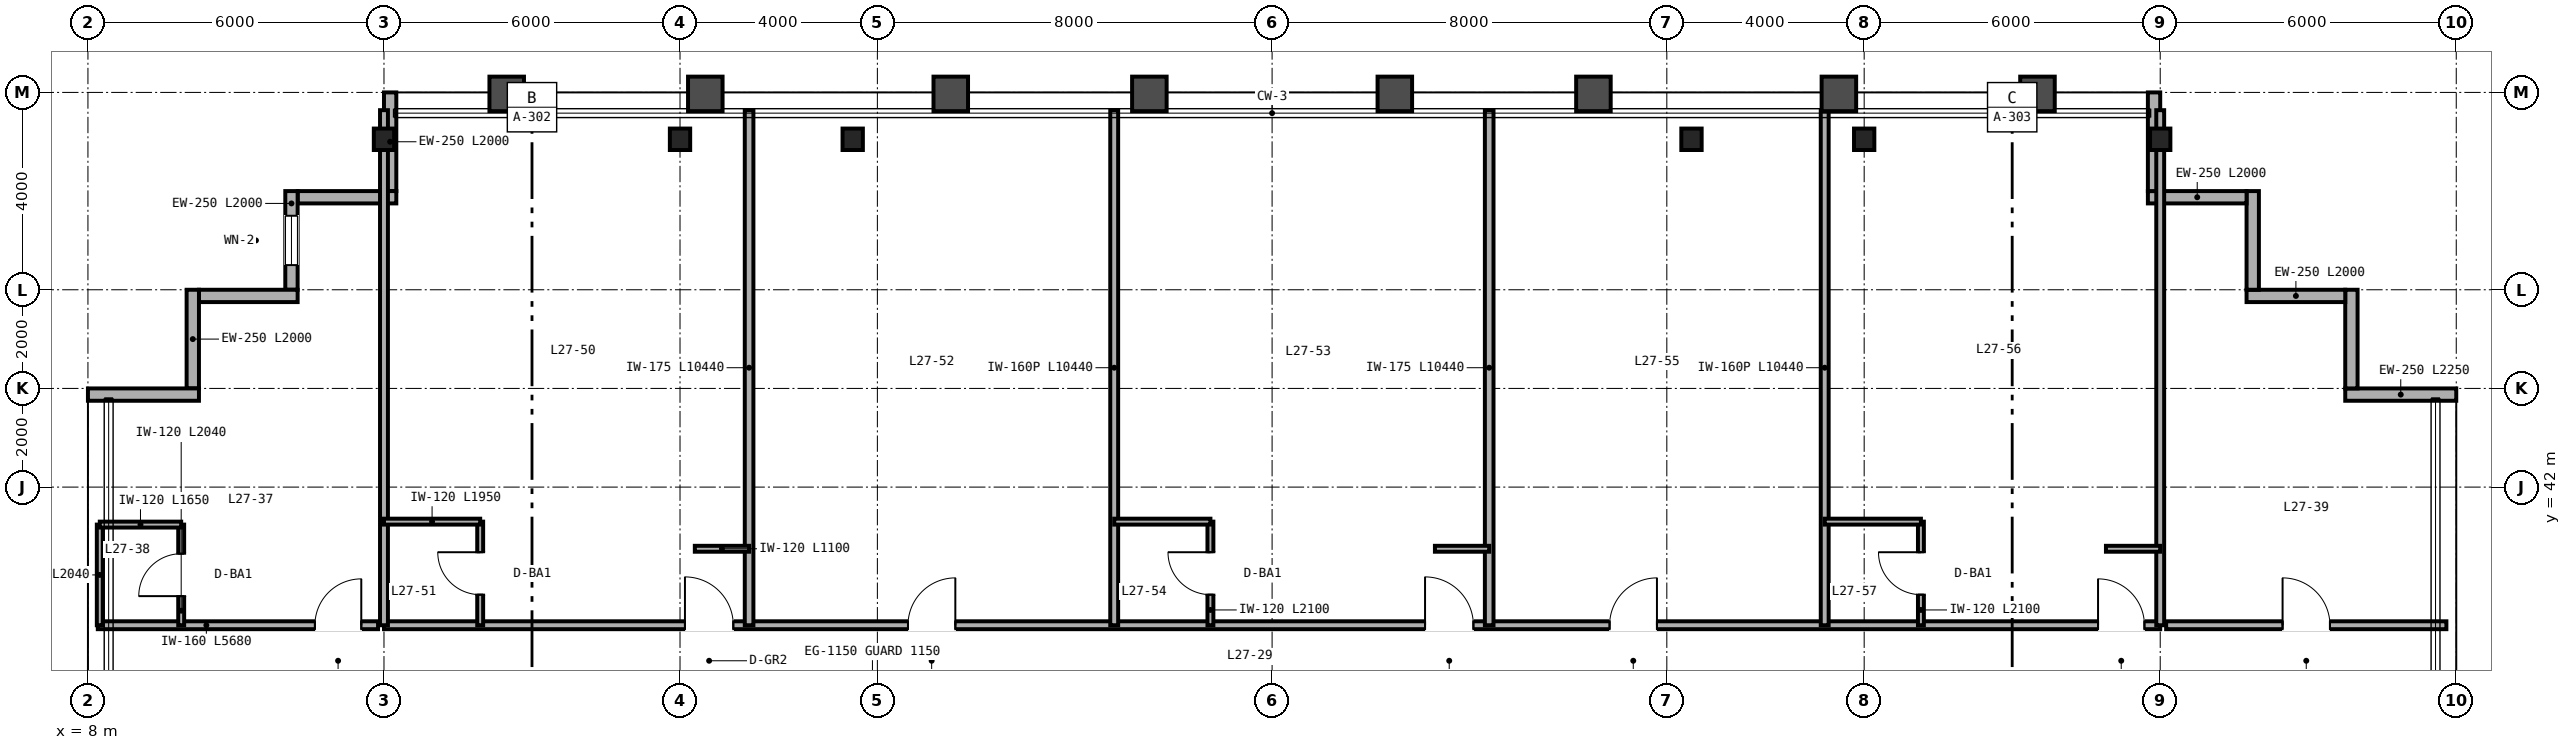
"""IFC4 building model, lengths in metres.
Left out: names, types, materials, properties, quantities, classifications, styles, units other than length and angle.
Written with IfcOpenShell. Run it as: python <this file> out.ifc"""

import sys

from ifc_helpers import new_model, si_unit, direction, frame, frame_2d, origin, origin_2d, place, context, subcontext, project, spatial, rectangle, i_section, extrude, source, transform, mapped, element, fill, save


model = new_model("IFC4")
c1 = context("Model", 3, precision=1e-05, world=origin(), true_north=direction((0.0, 1.0)))
c2 = subcontext(c1, "Body", "Model", "MODEL_VIEW")
j1 = project(units=[si_unit("LENGTHUNIT", "METRE"), si_unit("PLANEANGLEUNIT", "RADIAN")], contexts=[c1])
p1 = place(None, origin())
s1 = spatial("IfcSite", under=j1, at=p1, CompositionType="ELEMENT")
p2 = place(p1, origin())
s2 = spatial("IfcBuilding", under=s1, at=p2, CompositionType="ELEMENT")
p3 = place(p2, frame((0.0, 0.0, 111.6)))
s3 = spatial("IfcBuildingStorey", under=s2, at=p3, CompositionType="ELEMENT", Elevation=111.6)
m1 = source(origin(), c2, "Body", "SweptSolid", [
    extrude(i_section(OverallWidth=0.412, OverallDepth=0.435, WebThickness=0.036, FlangeThickness=0.057, FilletRadius=0.025, at=origin_2d()), origin(), (0.0, 0.0, 1.0), 3.36),
])
for number, where, z_axis, x_axis in (
    (1, (14.0, 49.05, 0.0), (0.0, 0.0, 1.0), (1.0, 0.0, 0.0)),
    (2, (20.0, 49.05, 0.0), (0.0, 0.0, 1.0), (1.0, 0.0, 0.0)),
    (3, (23.5, 49.05, 0.0), (0.0, 0.0, 1.0), (1.0, 0.0, 0.0)),
    (4, (40.5, 49.05, 0.0), (0.0, 0.0, 1.0), (1.0, 0.0, 0.0)),
    (5, (44.0, 49.05, 0.0), (0.0, 0.0, 1.0), (1.0, 0.0, 0.0)),
    (6, (50.0, 49.05, 0.0), (0.0, 0.0, 1.0), (1.0, 0.0, 0.0)),
):
    element("IfcColumn", number, at=place(p3, frame(where, z_axis=z_axis, x_axis=x_axis)), inside=s3, PredefinedType="COLUMN", context=c2, shape_type="MappedRepresentation", body=[
        mapped(m1, transform((0.0, 0.0, 0.0), scale=1.0)),
    ])
p4 = place(p3, frame((56.0, 43.875, 0.0), z_axis=(0.0, 0.0, 1.0), x_axis=(-1.0, 0.0, 0.0)))
e7 = element("IfcWall", 7, at=p4, inside=s3, PredefinedType="SOLIDWALL", context=c2, shape_type="SweptSolid", body=[
    extrude(rectangle(XDim=2.25, YDim=0.25, at=frame_2d((1.125, 0.0))), origin(), (0.0, 0.0, 1.0), 3.36),
])
for number, where, z_axis, x_axis in (
    (8, (53.875, 44.0, 0.0), (0.0, 0.0, 1.0), (0.0, 1.0, 0.0)),
    (9, (53.75, 45.875, 0.0), (0.0, 0.0, 1.0), (-1.0, 0.0, 0.0)),
    (10, (51.875, 46.0, 0.0), (0.0, 0.0, 1.0), (0.0, 1.0, 0.0)),
    (11, (51.75, 47.875, 0.0), (0.0, 0.0, 1.0), (-1.0, 0.0, 0.0)),
):
    element("IfcWall", number, at=place(p3, frame(where, z_axis=z_axis, x_axis=x_axis)), inside=s3, PredefinedType="SOLIDWALL", context=c2, shape_type="SweptSolid", body=[
        extrude(rectangle(XDim=2.0, YDim=0.25, at=frame_2d((1.0, 0.0))), origin(), (0.0, 0.0, 1.0), 3.36),
    ])
for number, where, z_axis, x_axis in (
    (12, (49.875, 48.0, 0.0), (0.0, 0.0, 1.0), (0.0, 1.0, 0.0)),
    (13, (14.125, 50.0, 0.0), (0.0, 0.0, 1.0), (0.0, -1.0, 0.0)),
):
    element("IfcWall", number, at=place(p3, frame(where, z_axis=z_axis, x_axis=x_axis)), inside=s3, PredefinedType="SOLIDWALL", context=c2, shape_type="SweptSolid", body=[
        extrude(rectangle(XDim=2.0, YDim=0.25, at=frame_2d((1.0, 0.0))), origin(), (0.0, 0.0, 1.0), 2.667),
    ])
p5 = place(p3, frame((14.25, 47.875, 0.0), z_axis=(0.0, 0.0, 1.0), x_axis=(-1.0, 0.0, 0.0)))
e14 = element("IfcWall", 14, at=p5, inside=s3, PredefinedType="SOLIDWALL", context=c2, shape_type="SweptSolid", body=[
    extrude(rectangle(XDim=2.0, YDim=0.25, at=frame_2d((1.0, 0.0))), origin(), (0.0, 0.0, 1.0), 3.36),
])
p6 = place(p3, frame((12.125, 48.0, 0.0), z_axis=(0.0, 0.0, 1.0), x_axis=(0.0, -1.0, 0.0)))
e15 = element("IfcWall", 15, at=p6, inside=s3, PredefinedType="SOLIDWALL", context=c2, shape_type="SweptSolid", body=[
    extrude(rectangle(XDim=2.0, YDim=0.25, at=frame_2d((1.0, 0.0))), origin(), (0.0, 0.0, 1.0), 3.36),
])
p7 = place(p6, frame((0.5, 0.0, 0.85)))
e16 = element("IfcOpeningElement", 16, at=p7, cuts=e15, PredefinedType="OPENING", context=c2, shape_type="SweptSolid", body=[
    extrude(rectangle(XDim=1.0, YDim=1.9, at=frame_2d((0.5, 0.95))), frame((0.0, 0.135, 0.0), z_axis=(0.0, -1.0, 0.0), x_axis=(1.0, 0.0, 0.0)), (0.0, 0.0, 1.0), 0.27),
])
for number, where, z_axis, x_axis in (
    (17, (12.25, 45.875, 0.0), (0.0, 0.0, 1.0), (-1.0, 0.0, 0.0)),
    (18, (10.125, 46.0, 0.0), (0.0, 0.0, 1.0), (0.0, -1.0, 0.0)),
):
    element("IfcWall", number, at=place(p3, frame(where, z_axis=z_axis, x_axis=x_axis)), inside=s3, PredefinedType="SOLIDWALL", context=c2, shape_type="SweptSolid", body=[
        extrude(rectangle(XDim=2.0, YDim=0.25, at=frame_2d((1.0, 0.0))), origin(), (0.0, 0.0, 1.0), 3.36),
    ])
p8 = place(p3, frame((10.25, 43.875, 0.0), z_axis=(0.0, 0.0, 1.0), x_axis=(-1.0, 0.0, 0.0)))
e19 = element("IfcWall", 19, at=p8, inside=s3, PredefinedType="SOLIDWALL", context=c2, shape_type="SweptSolid", body=[
    extrude(rectangle(XDim=2.25, YDim=0.25, at=frame_2d((1.125, 0.0))), origin(), (0.0, 0.0, 1.0), 3.36),
])
p9 = place(p3, frame((8.2, 39.2, 0.0), z_axis=(0.0, 0.0, 1.0), x_axis=(1.0, 0.0, 0.0)))
e20 = element("IfcWall", 20, at=p9, inside=s3, PredefinedType="PARTITIONING", context=c2, shape_type="SweptSolid", body=[
    extrude(rectangle(XDim=5.68, YDim=0.16, at=frame_2d((2.84, 0.0))), origin(), (0.0, 0.0, 1.0), 3.36),
])
p10 = place(p9, frame((4.4, 0.0, 0.0)))
e21 = element("IfcOpeningElement", 21, at=p10, cuts=e20, PredefinedType="OPENING", context=c2, shape_type="SweptSolid", body=[
    extrude(rectangle(XDim=0.94, YDim=2.15, at=frame_2d((0.47, 1.075))), frame((0.0, 0.09, 0.0), z_axis=(0.0, -1.0, 0.0), x_axis=(1.0, 0.0, 0.0)), (0.0, 0.0, 1.0), 0.18),
])
p11 = place(p3, frame((9.89, 39.2, 0.0), z_axis=(0.0, 0.0, 1.0), x_axis=(0.0, 1.0, 0.0)))
e22 = element("IfcWall", 22, at=p11, inside=s3, PredefinedType="PARTITIONING", context=c2, shape_type="SweptSolid", body=[
    extrude(rectangle(XDim=2.04, YDim=0.12, at=frame_2d((1.02, 0.0))), origin(), (0.0, 0.0, 1.0), 3.36),
])
p12 = place(p11, frame((0.59, 0.0, 0.0)))
e23 = element("IfcOpeningElement", 23, at=p12, cuts=e22, PredefinedType="OPENING", context=c2, shape_type="SweptSolid", body=[
    extrude(rectangle(XDim=0.86, YDim=2.1, at=frame_2d((0.43, 1.05))), frame((0.0, 0.07, 0.0), z_axis=(0.0, -1.0, 0.0), x_axis=(1.0, 0.0, 0.0)), (0.0, 0.0, 1.0), 0.14),
])
p13 = place(p3, frame((8.24, 39.2, 0.0), z_axis=(0.0, 0.0, 1.0), x_axis=(0.0, 1.0, 0.0)))
e24 = element("IfcWall", 24, at=p13, inside=s3, PredefinedType="PARTITIONING", context=c2, shape_type="SweptSolid", body=[
    extrude(rectangle(XDim=2.04, YDim=0.12, at=frame_2d((1.02, 0.0))), origin(), (0.0, 0.0, 1.0), 3.36),
])
p14 = place(p3, frame((8.24, 41.24, 0.0), z_axis=(0.0, 0.0, 1.0), x_axis=(1.0, 0.0, 0.0)))
e25 = element("IfcWall", 25, at=p14, inside=s3, PredefinedType="PARTITIONING", context=c2, shape_type="SweptSolid", body=[
    extrude(rectangle(XDim=1.65, YDim=0.12, at=frame_2d((0.825, 0.0))), origin(), (0.0, 0.0, 1.0), 3.36),
])
p15 = place(p3, frame((50.12, 39.2, 0.0), z_axis=(0.0, 0.0, 1.0), x_axis=(1.0, 0.0, 0.0)))
e26 = element("IfcWall", 26, at=p15, inside=s3, PredefinedType="PARTITIONING", context=c2, shape_type="SweptSolid", body=[
    extrude(rectangle(XDim=5.68, YDim=0.16, at=frame_2d((2.84, 0.0))), origin(), (0.0, 0.0, 1.0), 3.36),
])
p16 = place(p15, frame((2.36, 0.0, 0.0)))
e27 = element("IfcOpeningElement", 27, at=p16, cuts=e26, PredefinedType="OPENING", context=c2, shape_type="SweptSolid", body=[
    extrude(rectangle(XDim=0.96, YDim=2.15, at=frame_2d((0.48, 1.075))), frame((0.0, 0.09, 0.0), z_axis=(0.0, -1.0, 0.0), x_axis=(1.0, 0.0, 0.0)), (0.0, 0.0, 1.0), 0.18),
])
p17 = place(p3, frame((14.0, 39.2, 0.0), z_axis=(0.0, 0.0, 1.0), x_axis=(1.0, 0.0, 0.0)))
e28 = element("IfcWall", 28, at=p17, inside=s3, PredefinedType="PARTITIONING", context=c2, shape_type="SweptSolid", body=[
    extrude(rectangle(XDim=36.0, YDim=0.16, at=frame_2d((18.0, 0.0))), origin(), (0.0, 0.0, 1.0), 2.581),
])
p18 = place(p17, frame((6.1, 0.0, 0.0)))
e29 = element("IfcOpeningElement", 29, at=p18, cuts=e28, PredefinedType="OPENING", context=c2, shape_type="SweptSolid", body=[
    extrude(rectangle(XDim=0.98, YDim=2.2, at=frame_2d((0.49, 1.1))), frame((0.0, 0.09, 0.0), z_axis=(0.0, -1.0, 0.0), x_axis=(1.0, 0.0, 0.0)), (0.0, 0.0, 1.0), 0.18),
])
p19 = place(p17, frame((10.62, 0.0, 0.0)))
e30 = element("IfcOpeningElement", 30, at=p19, cuts=e28, PredefinedType="OPENING", context=c2, shape_type="SweptSolid", body=[
    extrude(rectangle(XDim=0.96, YDim=2.15, at=frame_2d((0.48, 1.075))), frame((0.0, 0.09, 0.0), z_axis=(0.0, -1.0, 0.0), x_axis=(1.0, 0.0, 0.0)), (0.0, 0.0, 1.0), 0.18),
])
p20 = place(p17, frame((21.1, 0.0, 0.0)))
e31 = element("IfcOpeningElement", 31, at=p20, cuts=e28, PredefinedType="OPENING", context=c2, shape_type="SweptSolid", body=[
    extrude(rectangle(XDim=0.98, YDim=2.2, at=frame_2d((0.49, 1.1))), frame((0.0, 0.09, 0.0), z_axis=(0.0, -1.0, 0.0), x_axis=(1.0, 0.0, 0.0)), (0.0, 0.0, 1.0), 0.18),
])
p21 = place(p17, frame((24.84, 0.0, 0.0)))
e32 = element("IfcOpeningElement", 32, at=p21, cuts=e28, PredefinedType="OPENING", context=c2, shape_type="SweptSolid", body=[
    extrude(rectangle(XDim=0.96, YDim=2.15, at=frame_2d((0.48, 1.075))), frame((0.0, 0.09, 0.0), z_axis=(0.0, -1.0, 0.0), x_axis=(1.0, 0.0, 0.0)), (0.0, 0.0, 1.0), 0.18),
])
p22 = place(p17, frame((34.74, 0.0, 0.0)))
e33 = element("IfcOpeningElement", 33, at=p22, cuts=e28, PredefinedType="OPENING", context=c2, shape_type="SweptSolid", body=[
    extrude(rectangle(XDim=0.94, YDim=2.15, at=frame_2d((0.47, 1.075))), frame((0.0, 0.09, 0.0), z_axis=(0.0, -1.0, 0.0), x_axis=(1.0, 0.0, 0.0)), (0.0, 0.0, 1.0), 0.18),
])
for number, where, z_axis, x_axis in (
    (34, (14.0, 39.2, 0.0), (0.0, 0.0, 1.0), (0.0, 1.0, 0.0)),
    (35, (50.0, 39.2, 0.0), (0.0, 0.0, 1.0), (0.0, 1.0, 0.0)),
):
    element("IfcWall", number, at=place(p3, frame(where, z_axis=z_axis, x_axis=x_axis)), inside=s3, PredefinedType="PARTITIONING", context=c2, shape_type="SweptSolid", body=[
        extrude(rectangle(XDim=10.44, YDim=0.16, at=frame_2d((5.22, 0.0))), origin(), (0.0, 0.0, 1.0), 2.667),
    ])
p23 = place(p3, frame((21.4, 39.2, 0.0), z_axis=(0.0, 0.0, 1.0), x_axis=(0.0, 1.0, 0.0)))
e36 = element("IfcWall", 36, at=p23, inside=s3, PredefinedType="PARTITIONING", context=c2, shape_type="SweptSolid", body=[
    extrude(rectangle(XDim=10.44, YDim=0.175, at=frame_2d((5.22, 0.0))), origin(), (0.0, 0.0, 1.0), 2.823),
])
p24 = place(p3, frame((15.95, 39.2, 0.0), z_axis=(0.0, 0.0, 1.0), x_axis=(0.0, 1.0, 0.0)))
e37 = element("IfcWall", 37, at=p24, inside=s3, PredefinedType="PARTITIONING", context=c2, shape_type="SweptSolid", body=[
    extrude(rectangle(XDim=2.1, YDim=0.12, at=frame_2d((1.05, 0.0))), origin(), (0.0, 0.0, 1.0), 3.36),
])
p25 = place(p24, frame((0.62, 0.0, 0.0)))
e38 = element("IfcOpeningElement", 38, at=p25, cuts=e37, PredefinedType="OPENING", context=c2, shape_type="SweptSolid", body=[
    extrude(rectangle(XDim=0.86, YDim=2.1, at=frame_2d((0.43, 1.05))), frame((0.0, 0.07, 0.0), z_axis=(0.0, -1.0, 0.0), x_axis=(1.0, 0.0, 0.0)), (0.0, 0.0, 1.0), 0.14),
])
p26 = place(p3, frame((14.0, 41.3, 0.0), z_axis=(0.0, 0.0, 1.0), x_axis=(1.0, 0.0, 0.0)))
e39 = element("IfcWall", 39, at=p26, inside=s3, PredefinedType="PARTITIONING", context=c2, shape_type="SweptSolid", body=[
    extrude(rectangle(XDim=1.95, YDim=0.12, at=frame_2d((0.975, 0.0))), origin(), (0.0, 0.0, 1.0), 3.36),
])
p27 = place(p3, frame((20.3, 40.75, 0.0), z_axis=(0.0, 0.0, 1.0), x_axis=(1.0, 0.0, 0.0)))
e40 = element("IfcWall", 40, at=p27, inside=s3, PredefinedType="PARTITIONING", context=c2, shape_type="SweptSolid", body=[
    extrude(rectangle(XDim=1.1, YDim=0.12, at=frame_2d((0.55, 0.0))), origin(), (0.0, 0.0, 1.0), 3.36),
])
p28 = place(p3, frame((28.8, 39.2, 0.0), z_axis=(0.0, 0.0, 1.0), x_axis=(0.0, 1.0, 0.0)))
e41 = element("IfcWall", 41, at=p28, inside=s3, PredefinedType="PARTITIONING", context=c2, shape_type="SweptSolid", body=[
    extrude(rectangle(XDim=10.44, YDim=0.16, at=frame_2d((5.22, 0.0))), origin(), (0.0, 0.0, 1.0), 2.433),
])
p29 = place(p3, frame((36.4, 39.2, 0.0), z_axis=(0.0, 0.0, 1.0), x_axis=(0.0, 1.0, 0.0)))
e42 = element("IfcWall", 42, at=p29, inside=s3, PredefinedType="PARTITIONING", context=c2, shape_type="SweptSolid", body=[
    extrude(rectangle(XDim=10.44, YDim=0.175, at=frame_2d((5.22, 0.0))), origin(), (0.0, 0.0, 1.0), 2.433),
])
p30 = place(p3, frame((30.75, 39.2, 0.0), z_axis=(0.0, 0.0, 1.0), x_axis=(0.0, 1.0, 0.0)))
e43 = element("IfcWall", 43, at=p30, inside=s3, PredefinedType="PARTITIONING", context=c2, shape_type="SweptSolid", body=[
    extrude(rectangle(XDim=2.1, YDim=0.12, at=frame_2d((1.05, 0.0))), origin(), (0.0, 0.0, 1.0), 3.36),
])
p31 = place(p30, frame((0.62, 0.0, 0.0)))
e44 = element("IfcOpeningElement", 44, at=p31, cuts=e43, PredefinedType="OPENING", context=c2, shape_type="SweptSolid", body=[
    extrude(rectangle(XDim=0.86, YDim=2.1, at=frame_2d((0.43, 1.05))), frame((0.0, 0.07, 0.0), z_axis=(0.0, -1.0, 0.0), x_axis=(1.0, 0.0, 0.0)), (0.0, 0.0, 1.0), 0.14),
])
p32 = place(p3, frame((28.8, 41.3, 0.0), z_axis=(0.0, 0.0, 1.0), x_axis=(1.0, 0.0, 0.0)))
e45 = element("IfcWall", 45, at=p32, inside=s3, PredefinedType="PARTITIONING", context=c2, shape_type="SweptSolid", body=[
    extrude(rectangle(XDim=1.95, YDim=0.12, at=frame_2d((0.975, 0.0))), origin(), (0.0, 0.0, 1.0), 3.36),
])
p33 = place(p3, frame((35.3, 40.75, 0.0), z_axis=(0.0, 0.0, 1.0), x_axis=(1.0, 0.0, 0.0)))
e46 = element("IfcWall", 46, at=p33, inside=s3, PredefinedType="PARTITIONING", context=c2, shape_type="SweptSolid", body=[
    extrude(rectangle(XDim=1.1, YDim=0.12, at=frame_2d((0.55, 0.0))), origin(), (0.0, 0.0, 1.0), 3.36),
])
p34 = place(p3, frame((43.2, 39.2, 0.0), z_axis=(0.0, 0.0, 1.0), x_axis=(0.0, 1.0, 0.0)))
e47 = element("IfcWall", 47, at=p34, inside=s3, PredefinedType="PARTITIONING", context=c2, shape_type="SweptSolid", body=[
    extrude(rectangle(XDim=10.44, YDim=0.16, at=frame_2d((5.22, 0.0))), origin(), (0.0, 0.0, 1.0), 2.823),
])
p35 = place(p3, frame((45.15, 39.2, 0.0), z_axis=(0.0, 0.0, 1.0), x_axis=(0.0, 1.0, 0.0)))
e48 = element("IfcWall", 48, at=p35, inside=s3, PredefinedType="PARTITIONING", context=c2, shape_type="SweptSolid", body=[
    extrude(rectangle(XDim=2.1, YDim=0.12, at=frame_2d((1.05, 0.0))), origin(), (0.0, 0.0, 1.0), 3.36),
])
p36 = place(p35, frame((0.62, 0.0, 0.0)))
e49 = element("IfcOpeningElement", 49, at=p36, cuts=e48, PredefinedType="OPENING", context=c2, shape_type="SweptSolid", body=[
    extrude(rectangle(XDim=0.86, YDim=2.1, at=frame_2d((0.43, 1.05))), frame((0.0, 0.07, 0.0), z_axis=(0.0, -1.0, 0.0), x_axis=(1.0, 0.0, 0.0)), (0.0, 0.0, 1.0), 0.14),
])
p37 = place(p3, frame((43.2, 41.3, 0.0), z_axis=(0.0, 0.0, 1.0), x_axis=(1.0, 0.0, 0.0)))
e50 = element("IfcWall", 50, at=p37, inside=s3, PredefinedType="PARTITIONING", context=c2, shape_type="SweptSolid", body=[
    extrude(rectangle(XDim=1.95, YDim=0.12, at=frame_2d((0.975, 0.0))), origin(), (0.0, 0.0, 1.0), 3.36),
])
p38 = place(p3, frame((48.9, 40.75, 0.0), z_axis=(0.0, 0.0, 1.0), x_axis=(1.0, 0.0, 0.0)))
e51 = element("IfcWall", 51, at=p38, inside=s3, PredefinedType="PARTITIONING", context=c2, shape_type="SweptSolid", body=[
    extrude(rectangle(XDim=1.1, YDim=0.12, at=frame_2d((0.55, 0.0))), origin(), (0.0, 0.0, 1.0), 3.36),
])
m2 = source(origin(), c2, "Body", "SweptSolid", [
    extrude(rectangle(XDim=1.0, YDim=1.9, at=frame_2d((0.5, 0.95))), frame((0.0, 0.03, 0.0), z_axis=(0.0, -1.0, 0.0), x_axis=(1.0, 0.0, 0.0)), (0.0, 0.0, 1.0), 0.06),
])
p39 = place(p7, origin())
e52 = element("IfcWindow", 52, at=p39, inside=s3, PartitioningType="SINGLE_PANEL", PredefinedType="WINDOW", context=c2, shape_type="MappedRepresentation", body=[
    mapped(m2, transform((0.0, 0.0, 0.0), scale=1.0)),
])
fill(e16, e52)
m3 = source(origin(), c2, "Body", "SweptSolid", [
    extrude(rectangle(XDim=0.86, YDim=2.1, at=frame_2d((0.43, 1.05))), frame((0.0, 0.025, 0.0), z_axis=(0.0, -1.0, 0.0), x_axis=(1.0, 0.0, 0.0)), (0.0, 0.0, 1.0), 0.05),
])
p40 = place(p12, origin())
e53 = element("IfcDoor", 53, at=p40, inside=s3, OperationType="SINGLE_SWING_LEFT", PredefinedType="DOOR", context=c2, shape_type="MappedRepresentation", body=[
    mapped(m3, transform((0.0, 0.0, 0.0), scale=1.0)),
])
fill(e23, e53)
m4 = source(origin(), c2, "Body", "SweptSolid", [
    extrude(rectangle(XDim=0.94, YDim=2.15, at=frame_2d((0.47, 1.075))), frame((0.0, 0.025, 0.0), z_axis=(0.0, -1.0, 0.0), x_axis=(1.0, 0.0, 0.0)), (0.0, 0.0, 1.0), 0.05),
])
p41 = place(p10, origin())
e54 = element("IfcDoor", 54, at=p41, inside=s3, OperationType="SINGLE_SWING_RIGHT", PredefinedType="DOOR", context=c2, shape_type="MappedRepresentation", body=[
    mapped(m4, transform((0.0, 0.0, 0.0), scale=1.0)),
])
fill(e21, e54)
m5 = source(origin(), c2, "Body", "SweptSolid", [
    extrude(rectangle(XDim=0.96, YDim=2.15, at=frame_2d((0.48, 1.075))), frame((0.0, 0.025, 0.0), z_axis=(0.0, -1.0, 0.0), x_axis=(1.0, 0.0, 0.0)), (0.0, 0.0, 1.0), 0.05),
])
p42 = place(p16, origin())
e55 = element("IfcDoor", 55, at=p42, inside=s3, OperationType="SINGLE_SWING_LEFT", PredefinedType="DOOR", context=c2, shape_type="MappedRepresentation", body=[
    mapped(m5, transform((0.0, 0.0, 0.0), scale=1.0)),
])
fill(e27, e55)
p43 = place(p25, origin())
e56 = element("IfcDoor", 56, at=p43, inside=s3, OperationType="SINGLE_SWING_RIGHT", PredefinedType="DOOR", context=c2, shape_type="MappedRepresentation", body=[
    mapped(m3, transform((0.0, 0.0, 0.0), scale=1.0)),
])
fill(e38, e56)
p44 = place(p31, origin())
e57 = element("IfcDoor", 57, at=p44, inside=s3, OperationType="SINGLE_SWING_RIGHT", PredefinedType="DOOR", context=c2, shape_type="MappedRepresentation", body=[
    mapped(m3, transform((0.0, 0.0, 0.0), scale=1.0)),
])
fill(e44, e57)
p45 = place(p36, origin())
e58 = element("IfcDoor", 58, at=p45, inside=s3, OperationType="SINGLE_SWING_RIGHT", PredefinedType="DOOR", context=c2, shape_type="MappedRepresentation", body=[
    mapped(m3, transform((0.0, 0.0, 0.0), scale=1.0)),
])
fill(e49, e58)
m6 = source(origin(), c2, "Body", "SweptSolid", [
    extrude(rectangle(XDim=0.98, YDim=2.2, at=frame_2d((0.49, 1.1))), frame((0.0, 0.025, 0.0), z_axis=(0.0, -1.0, 0.0), x_axis=(1.0, 0.0, 0.0)), (0.0, 0.0, 1.0), 0.05),
])
p46 = place(p18, origin())
e59 = element("IfcDoor", 59, at=p46, inside=s3, OperationType="SINGLE_SWING_LEFT", PredefinedType="DOOR", context=c2, shape_type="MappedRepresentation", body=[
    mapped(m6, transform((0.0, 0.0, 0.0), scale=1.0)),
])
fill(e29, e59)
p47 = place(p19, origin())
e60 = element("IfcDoor", 60, at=p47, inside=s3, OperationType="SINGLE_SWING_RIGHT", PredefinedType="DOOR", context=c2, shape_type="MappedRepresentation", body=[
    mapped(m5, transform((0.0, 0.0, 0.0), scale=1.0)),
])
fill(e30, e60)
p48 = place(p20, origin())
e61 = element("IfcDoor", 61, at=p48, inside=s3, OperationType="SINGLE_SWING_LEFT", PredefinedType="DOOR", context=c2, shape_type="MappedRepresentation", body=[
    mapped(m6, transform((0.0, 0.0, 0.0), scale=1.0)),
])
fill(e31, e61)
p49 = place(p21, origin())
e62 = element("IfcDoor", 62, at=p49, inside=s3, OperationType="SINGLE_SWING_RIGHT", PredefinedType="DOOR", context=c2, shape_type="MappedRepresentation", body=[
    mapped(m5, transform((0.0, 0.0, 0.0), scale=1.0)),
])
fill(e32, e62)
p50 = place(p22, origin())
e63 = element("IfcDoor", 63, at=p50, inside=s3, OperationType="SINGLE_SWING_LEFT", PredefinedType="DOOR", context=c2, shape_type="MappedRepresentation", body=[
    mapped(m4, transform((0.0, 0.0, 0.0), scale=1.0)),
])
fill(e33, e63)
save(model, sys.argv[1])
